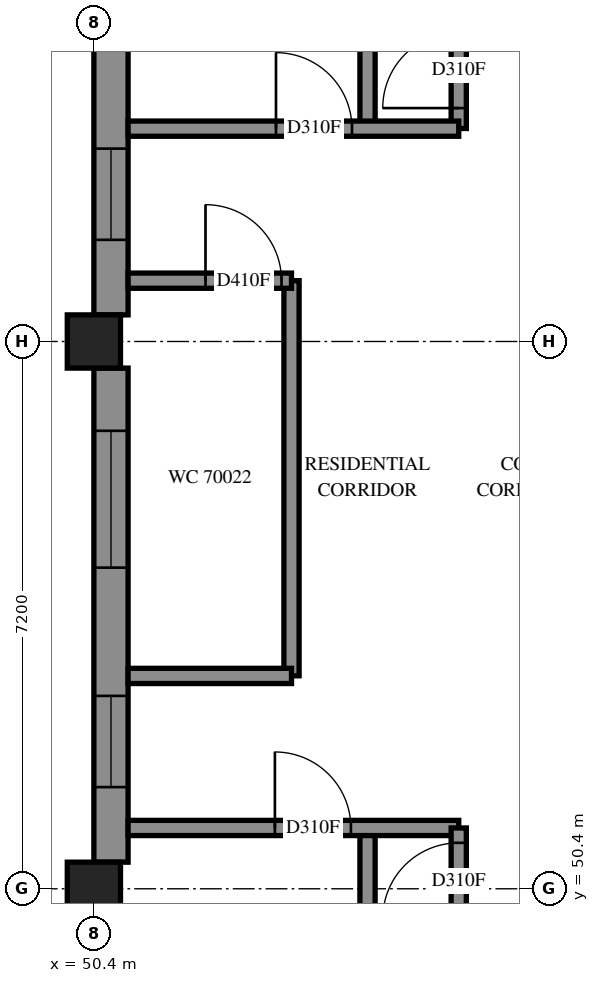
"""IFC4 building model, lengths in metres.
Left out: names, types, materials, properties, quantities, classifications, styles, units other than length and angle.
Written with IfcOpenShell. Run it as: python <this file> out.ifc"""

import sys

from ifc_helpers import new_model, si_unit, direction, frame, frame_2d, origin, origin_2d, place, context, subcontext, project, spatial, rectangle, extrude, element, fill, save


model = new_model("IFC4")
c1 = context("Model", 3, precision=1e-05, world=origin(), true_north=direction((0.0, 1.0)))
c2 = subcontext(c1, "Body", "Model", "MODEL_VIEW")
j1 = project(units=[si_unit("LENGTHUNIT", "METRE"), si_unit("PLANEANGLEUNIT", "RADIAN")], contexts=[c1])
p1 = place(None, origin())
s1 = spatial("IfcSite", under=j1, at=p1, CompositionType="ELEMENT")
p2 = place(p1, origin())
s2 = spatial("IfcBuilding", under=s1, at=p2, CompositionType="ELEMENT")
p3 = place(p2, frame((0.0, 0.0, 257.4)))
s3 = spatial("IfcBuildingStorey", under=s2, at=p3, CompositionType="ELEMENT", Elevation=257.4)
for number, where, z_axis, x_axis in (
    (1, (50.4, 50.4, 0.0), (0.0, 0.0, 1.0), (1.0, 0.0, 0.0)),
    (2, (50.4, 57.6, 0.0), (0.0, 0.0, 1.0), (1.0, 0.0, 0.0)),
):
    element("IfcColumn", number, at=place(p3, frame(where, z_axis=z_axis, x_axis=x_axis)), inside=s3, PredefinedType="COLUMN", context=c2, shape_type="SweptSolid", body=[
        extrude(rectangle(XDim=0.7, YDim=0.7, at=origin_2d()), origin(), (0.0, 0.0, 1.0), 3.1),
    ])
p4 = place(p3, frame((50.625, 64.45, 0.0), z_axis=(0.0, 0.0, 1.0), x_axis=(0.0, -1.0, 0.0)))
e3 = element("IfcWall", 3, at=p4, inside=s3, PredefinedType="SOLIDWALL", context=c2, shape_type="SweptSolid", body=[
    extrude(rectangle(XDim=6.5, YDim=0.45, at=frame_2d((3.25, 0.0))), origin(), (0.0, 0.0, 1.0), 3.1),
])
p5 = place(p4, frame((0.825, 0.0, 0.7)))
e4 = element("IfcOpeningElement", 4, at=p5, cuts=e3, PredefinedType="OPENING", context=c2, shape_type="SweptSolid", body=[
    extrude(rectangle(XDim=1.8, YDim=1.8, at=frame_2d((0.9, 0.9))), frame((0.0, 0.235, 0.0), z_axis=(0.0, -1.0, 0.0), x_axis=(1.0, 0.0, 0.0)), (0.0, 0.0, 1.0), 0.47),
])
p6 = place(p4, frame((4.312, 0.0, 0.6)))
e5 = element("IfcOpeningElement", 5, at=p6, cuts=e3, PredefinedType="OPENING", context=c2, shape_type="SweptSolid", body=[
    extrude(rectangle(XDim=1.2, YDim=1.9, at=frame_2d((0.6, 0.95))), frame((0.0, 0.235, 0.0), z_axis=(0.0, -1.0, 0.0), x_axis=(1.0, 0.0, 0.0)), (0.0, 0.0, 1.0), 0.47),
])
p7 = place(p3, frame((50.625, 57.25, 0.0), z_axis=(0.0, 0.0, 1.0), x_axis=(0.0, -1.0, 0.0)))
e6 = element("IfcWall", 6, at=p7, inside=s3, PredefinedType="SOLIDWALL", context=c2, shape_type="SweptSolid", body=[
    extrude(rectangle(XDim=6.5, YDim=0.45, at=frame_2d((3.25, 0.0))), origin(), (0.0, 0.0, 1.0), 3.1),
])
p8 = place(p7, frame((0.825, 0.0, 0.7)))
e7 = element("IfcOpeningElement", 7, at=p8, cuts=e6, PredefinedType="OPENING", context=c2, shape_type="SweptSolid", body=[
    extrude(rectangle(XDim=1.8, YDim=1.8, at=frame_2d((0.9, 0.9))), frame((0.0, 0.235, 0.0), z_axis=(0.0, -1.0, 0.0), x_axis=(1.0, 0.0, 0.0)), (0.0, 0.0, 1.0), 0.47),
])
p9 = place(p7, frame((4.312, 0.0, 0.6)))
e8 = element("IfcOpeningElement", 8, at=p9, cuts=e6, PredefinedType="OPENING", context=c2, shape_type="SweptSolid", body=[
    extrude(rectangle(XDim=1.2, YDim=1.9, at=frame_2d((0.6, 0.95))), frame((0.0, 0.235, 0.0), z_axis=(0.0, -1.0, 0.0), x_axis=(1.0, 0.0, 0.0)), (0.0, 0.0, 1.0), 0.47),
])
p10 = place(p3, frame((54.0, 60.4, 0.0), z_axis=(0.0, 0.0, 1.0), x_axis=(0.0, 1.0, 0.0)))
e9 = element("IfcWall", 9, at=p10, inside=s3, PredefinedType="PARTITIONING", context=c2, shape_type="SweptSolid", body=[
    extrude(rectangle(XDim=12.419, YDim=0.2, at=frame_2d((6.21, 0.0))), origin(), (0.0, 0.0, 1.0), 3.1),
])
p11 = place(p3, frame((54.0, 42.312, 0.0), z_axis=(0.0, 0.0, 1.0), x_axis=(0.0, 1.0, 0.0)))
e10 = element("IfcWall", 10, at=p11, inside=s3, PredefinedType="PARTITIONING", context=c2, shape_type="SweptSolid", body=[
    extrude(rectangle(XDim=8.888, YDim=0.2, at=frame_2d((4.444, 0.0))), origin(), (0.0, 0.0, 1.0), 3.1),
])
p12 = place(p3, frame((55.2, 60.402, 0.0), z_axis=(0.0, 0.0, 1.0), x_axis=(0.0, 1.0, 0.0)))
e11 = element("IfcWall", 11, at=p12, inside=s3, PredefinedType="PARTITIONING", context=c2, shape_type="SweptSolid", body=[
    extrude(rectangle(XDim=6.798, YDim=0.2, at=frame_2d((3.399, 0.0))), origin(), (0.0, 0.0, 1.0), 3.1),
])
p13 = place(p12, frame((0.269, 0.0, 0.0)))
e12 = element("IfcOpeningElement", 12, at=p13, cuts=e11, PredefinedType="OPENING", context=c2, shape_type="SweptSolid", body=[
    extrude(rectangle(XDim=1.0, YDim=2.1, at=frame_2d((0.5, 1.05))), frame((0.0, 0.11, 0.0), z_axis=(0.0, -1.0, 0.0), x_axis=(1.0, 0.0, 0.0)), (0.0, 0.0, 1.0), 0.22),
])
p14 = place(p3, frame((53.0, 53.202, 0.0), z_axis=(0.0, 0.0, 1.0), x_axis=(0.0, 1.0, 0.0)))
e13 = element("IfcWall", 13, at=p14, inside=s3, PredefinedType="PARTITIONING", context=c2, shape_type="SweptSolid", body=[
    extrude(rectangle(XDim=5.198, YDim=0.2, at=frame_2d((2.599, 0.0))), origin(), (0.0, 0.0, 1.0), 3.1),
])
p15 = place(p3, frame((50.85, 51.2, 0.0), z_axis=(0.0, 0.0, 1.0), x_axis=(1.0, 0.0, 0.0)))
e14 = element("IfcWall", 14, at=p15, inside=s3, PredefinedType="PARTITIONING", context=c2, shape_type="SweptSolid", body=[
    extrude(rectangle(XDim=4.35, YDim=0.2, at=frame_2d((2.175, 0.0))), origin(), (0.0, 0.0, 1.0), 3.1),
])
p16 = place(p15, frame((1.931, 0.0, 0.0)))
e15 = element("IfcOpeningElement", 15, at=p16, cuts=e14, PredefinedType="OPENING", context=c2, shape_type="SweptSolid", body=[
    extrude(rectangle(XDim=1.0, YDim=2.1, at=frame_2d((0.5, 1.05))), frame((0.0, 0.11, 0.0), z_axis=(0.0, -1.0, 0.0), x_axis=(1.0, 0.0, 0.0)), (0.0, 0.0, 1.0), 0.22),
])
p17 = place(p3, frame((50.85, 60.4, 0.0), z_axis=(0.0, 0.0, 1.0), x_axis=(1.0, 0.0, 0.0)))
e16 = element("IfcWall", 16, at=p17, inside=s3, PredefinedType="PARTITIONING", context=c2, shape_type="SweptSolid", body=[
    extrude(rectangle(XDim=4.35, YDim=0.2, at=frame_2d((2.175, 0.0))), origin(), (0.0, 0.0, 1.0), 3.1),
])
p18 = place(p17, frame((1.946, 0.0, 0.0)))
e17 = element("IfcOpeningElement", 17, at=p18, cuts=e16, PredefinedType="OPENING", context=c2, shape_type="SweptSolid", body=[
    extrude(rectangle(XDim=1.0, YDim=2.1, at=frame_2d((0.5, 1.05))), frame((0.0, 0.11, 0.0), z_axis=(0.0, -1.0, 0.0), x_axis=(1.0, 0.0, 0.0)), (0.0, 0.0, 1.0), 0.22),
])
p19 = place(p3, frame((55.2, 48.0, 0.0), z_axis=(0.0, 0.0, 1.0), x_axis=(0.0, 1.0, 0.0)))
e18 = element("IfcWall", 18, at=p19, inside=s3, PredefinedType="PARTITIONING", context=c2, shape_type="SweptSolid", body=[
    extrude(rectangle(XDim=3.2, YDim=0.2, at=frame_2d((1.6, 0.0))), origin(), (0.0, 0.0, 1.0), 3.1),
])
p20 = place(p19, frame((2.004, 0.0, 0.0)))
e19 = element("IfcOpeningElement", 19, at=p20, cuts=e18, PredefinedType="OPENING", context=c2, shape_type="SweptSolid", body=[
    extrude(rectangle(XDim=1.0, YDim=2.1, at=frame_2d((0.5, 1.05))), frame((0.0, 0.11, 0.0), z_axis=(0.0, -1.0, 0.0), x_axis=(1.0, 0.0, 0.0)), (0.0, 0.0, 1.0), 0.22),
])
p21 = place(p3, frame((50.85, 53.2, 0.0), z_axis=(0.0, 0.0, 1.0), x_axis=(1.0, 0.0, 0.0)))
e20 = element("IfcWall", 20, at=p21, inside=s3, PredefinedType="PARTITIONING", context=c2, shape_type="SweptSolid", body=[
    extrude(rectangle(XDim=2.15, YDim=0.2, at=frame_2d((1.075, 0.0))), origin(), (0.0, 0.0, 1.0), 3.1),
])
p22 = place(p3, frame((50.85, 58.4, 0.0), z_axis=(0.0, 0.0, 1.0), x_axis=(1.0, 0.0, 0.0)))
e21 = element("IfcWall", 21, at=p22, inside=s3, PredefinedType="PARTITIONING", context=c2, shape_type="SweptSolid", body=[
    extrude(rectangle(XDim=2.15, YDim=0.2, at=frame_2d((1.075, 0.0))), origin(), (0.0, 0.0, 1.0), 3.1),
])
p23 = place(p22, frame((1.019, 0.0, 0.0)))
e22 = element("IfcOpeningElement", 22, at=p23, cuts=e21, PredefinedType="OPENING", context=c2, shape_type="SweptSolid", body=[
    extrude(rectangle(XDim=1.0, YDim=2.1, at=frame_2d((0.5, 1.05))), frame((0.0, 0.11, 0.0), z_axis=(0.0, -1.0, 0.0), x_axis=(1.0, 0.0, 0.0)), (0.0, 0.0, 1.0), 0.22),
])
p24 = place(p8, origin())
e23 = element("IfcWindow", 23, at=p24, inside=s3, PartitioningType="SINGLE_PANEL", PredefinedType="WINDOW", context=c2, shape_type="SweptSolid", body=[
    extrude(rectangle(XDim=1.8, YDim=1.8, at=frame_2d((0.9, 0.9))), frame((0.0, 0.205, 0.0), z_axis=(0.0, -1.0, 0.0), x_axis=(1.0, 0.0, 0.0)), (0.0, 0.0, 1.0), 0.06),
])
fill(e7, e23)
p25 = place(p16, origin())
e24 = element("IfcDoor", 24, at=p25, inside=s3, OperationType="SINGLE_SWING_LEFT", PredefinedType="DOOR", context=c2, shape_type="SweptSolid", body=[
    extrude(rectangle(XDim=1.0, YDim=2.1, at=frame_2d((0.5, 1.05))), frame((0.0, 0.025, 0.0), z_axis=(0.0, -1.0, 0.0), x_axis=(1.0, 0.0, 0.0)), (0.0, 0.0, 1.0), 0.05),
])
fill(e15, e24)
p26 = place(p20, origin())
e25 = element("IfcDoor", 25, at=p26, inside=s3, OperationType="SINGLE_SWING_RIGHT", PredefinedType="DOOR", context=c2, shape_type="SweptSolid", body=[
    extrude(rectangle(XDim=1.0, YDim=2.1, at=frame_2d((0.5, 1.05))), frame((0.0, 0.025, 0.0), z_axis=(0.0, -1.0, 0.0), x_axis=(1.0, 0.0, 0.0)), (0.0, 0.0, 1.0), 0.05),
])
fill(e19, e25)
p27 = place(p23, origin())
e26 = element("IfcDoor", 26, at=p27, inside=s3, OperationType="SINGLE_SWING_LEFT", PredefinedType="DOOR", context=c2, shape_type="SweptSolid", body=[
    extrude(rectangle(XDim=1.0, YDim=2.1, at=frame_2d((0.5, 1.05))), frame((0.0, 0.025, 0.0), z_axis=(0.0, -1.0, 0.0), x_axis=(1.0, 0.0, 0.0)), (0.0, 0.0, 1.0), 0.05),
])
fill(e22, e26)
p28 = place(p18, origin())
e27 = element("IfcDoor", 27, at=p28, inside=s3, OperationType="SINGLE_SWING_RIGHT", PredefinedType="DOOR", context=c2, shape_type="SweptSolid", body=[
    extrude(rectangle(XDim=1.0, YDim=2.1, at=frame_2d((0.5, 1.05))), frame((0.0, 0.025, 0.0), z_axis=(0.0, -1.0, 0.0), x_axis=(1.0, 0.0, 0.0)), (0.0, 0.0, 1.0), 0.05),
])
fill(e17, e27)
p29 = place(p13, origin())
e28 = element("IfcDoor", 28, at=p29, inside=s3, OperationType="SINGLE_SWING_LEFT", PredefinedType="DOOR", context=c2, shape_type="SweptSolid", body=[
    extrude(rectangle(XDim=1.0, YDim=2.1, at=frame_2d((0.5, 1.05))), frame((0.0, 0.025, 0.0), z_axis=(0.0, -1.0, 0.0), x_axis=(1.0, 0.0, 0.0)), (0.0, 0.0, 1.0), 0.05),
])
fill(e12, e28)
p30 = place(p6, origin())
e29 = element("IfcWindow", 29, at=p30, inside=s3, PartitioningType="SINGLE_PANEL", PredefinedType="WINDOW", context=c2, shape_type="SweptSolid", body=[
    extrude(rectangle(XDim=1.2, YDim=1.9, at=frame_2d((0.6, 0.95))), frame((0.0, 0.205, 0.0), z_axis=(0.0, -1.0, 0.0), x_axis=(1.0, 0.0, 0.0)), (0.0, 0.0, 1.0), 0.06),
])
fill(e5, e29)
p31 = place(p9, origin())
e30 = element("IfcWindow", 30, at=p31, inside=s3, PartitioningType="SINGLE_PANEL", PredefinedType="WINDOW", context=c2, shape_type="SweptSolid", body=[
    extrude(rectangle(XDim=1.2, YDim=1.9, at=frame_2d((0.6, 0.95))), frame((0.0, 0.205, 0.0), z_axis=(0.0, -1.0, 0.0), x_axis=(1.0, 0.0, 0.0)), (0.0, 0.0, 1.0), 0.06),
])
fill(e8, e30)
save(model, sys.argv[1])
